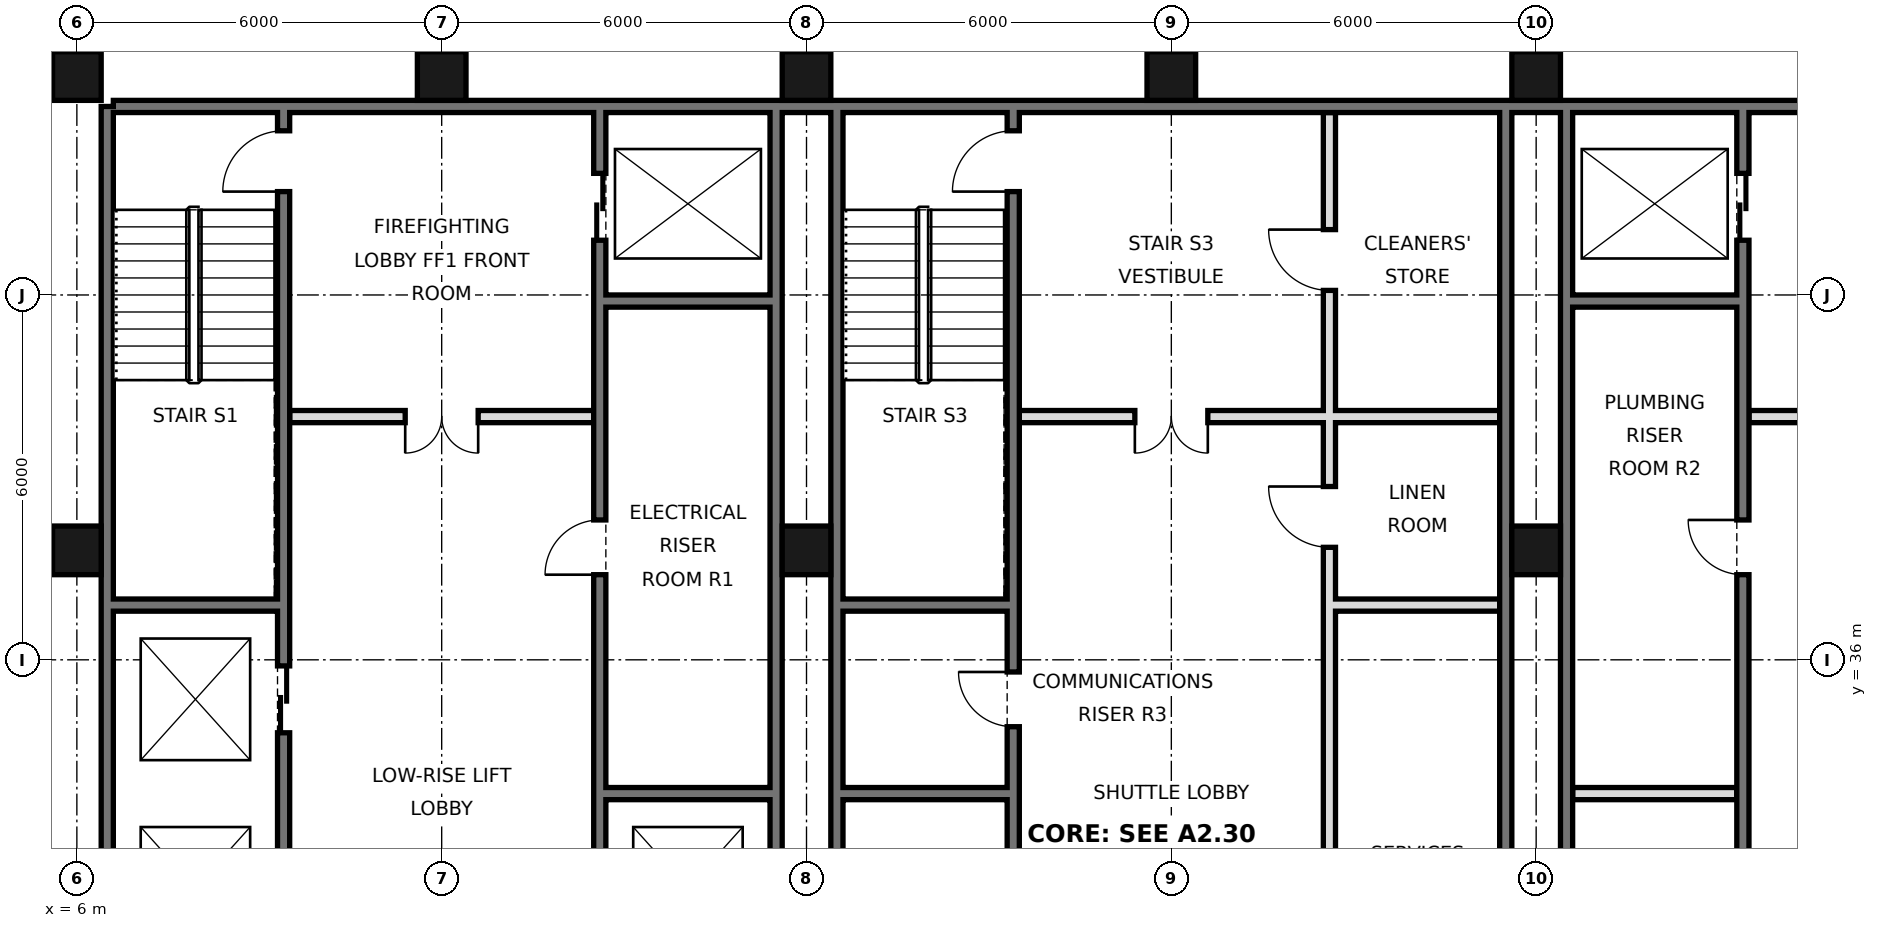
"""IFC4 building model, lengths in metres.
Left out: names, types, materials, properties, quantities, classifications, styles, units other than length and angle.
Written with IfcOpenShell. Run it as: python <this file> out.ifc"""

import sys

from ifc_helpers import new_model, si_unit, direction, frame, frame_2d, origin, origin_2d, place, context, subcontext, project, spatial, rectangle, hollow_rectangle, extrude, element, fill, save


model = new_model("IFC4")
c1 = context("Model", 3, precision=1e-05, world=origin(), true_north=direction((0.0, 1.0)))
c2 = subcontext(c1, "Body", "Model", "MODEL_VIEW")
j1 = project(units=[si_unit("LENGTHUNIT", "METRE"), si_unit("PLANEANGLEUNIT", "RADIAN")], contexts=[c1])
p1 = place(None, origin())
s1 = spatial("IfcSite", under=j1, at=p1, CompositionType="ELEMENT")
p2 = place(p1, origin())
s2 = spatial("IfcBuilding", under=s1, at=p2, CompositionType="ELEMENT")
p3 = place(p2, frame((0.0, 0.0, 119.6)))
s3 = spatial("IfcBuildingStorey", under=s2, at=p3, CompositionType="ELEMENT", Elevation=119.6)
for number, where, z_axis, x_axis in (
    (1, (6.0, 37.8, 0.0), (0.0, 0.0, 1.0), (1.0, 0.0, 0.0)),
    (2, (6.0, 45.6, 0.0), (0.0, 0.0, 1.0), (1.0, 0.0, 0.0)),
    (3, (12.0, 45.6, 0.0), (0.0, 0.0, 1.0), (1.0, 0.0, 0.0)),
    (4, (18.0, 37.8, 0.0), (0.0, 0.0, 1.0), (1.0, 0.0, 0.0)),
    (5, (18.0, 45.6, 0.0), (0.0, 0.0, 1.0), (1.0, 0.0, 0.0)),
    (6, (24.0, 45.6, 0.0), (0.0, 0.0, 1.0), (1.0, 0.0, 0.0)),
    (7, (30.0, 37.8, 0.0), (0.0, 0.0, 1.0), (1.0, 0.0, 0.0)),
    (8, (30.0, 45.6, 0.0), (0.0, 0.0, 1.0), (1.0, 0.0, 0.0)),
):
    element("IfcColumn", number, at=place(p3, frame(where, z_axis=z_axis, x_axis=x_axis)), inside=s3, PredefinedType="COLUMN", context=c2, shape_type="SweptSolid", body=[
        extrude(hollow_rectangle(XDim=0.8, YDim=0.8, WallThickness=0.05, at=origin_2d()), origin(), (0.0, 0.0, 1.0), 3.6),
    ])
p4 = place(p3, frame((6.5, 21.6, 0.0), z_axis=(0.0, 0.0, 1.0), x_axis=(0.0, 1.0, 0.0)))
e9 = element("IfcWall", 9, at=p4, inside=s3, PredefinedType="SOLIDWALL", context=c2, shape_type="SweptSolid", body=[
    extrude(rectangle(XDim=23.5, YDim=0.2, at=frame_2d((11.75, 0.0))), origin(), (0.0, 0.0, 1.0), 3.42),
])
p5 = place(p3, frame((6.6, 45.1, 0.0), z_axis=(0.0, 0.0, 1.0), x_axis=(1.0, 0.0, 0.0)))
e10 = element("IfcWall", 10, at=p5, inside=s3, PredefinedType="SOLIDWALL", context=c2, shape_type="SweptSolid", body=[
    extrude(rectangle(XDim=34.8, YDim=0.2, at=frame_2d((17.4, 0.0))), origin(), (0.0, 0.0, 1.0), 3.42),
])
for number, where, z_axis, x_axis in (
    (11, (17.5, 27.6, 0.0), (0.0, 0.0, 1.0), (0.0, 1.0, 0.0)),
    (12, (18.5, 27.6, 0.0), (0.0, 0.0, 1.0), (0.0, 1.0, 0.0)),
    (13, (29.5, 27.6, 0.0), (0.0, 0.0, 1.0), (0.0, 1.0, 0.0)),
    (14, (30.5, 27.6, 0.0), (0.0, 0.0, 1.0), (0.0, 1.0, 0.0)),
):
    element("IfcWall", number, at=place(p3, frame(where, z_axis=z_axis, x_axis=x_axis)), inside=s3, PredefinedType="SOLIDWALL", context=c2, shape_type="SweptSolid", body=[
        extrude(rectangle(XDim=17.5, YDim=0.2, at=frame_2d((8.75, 0.0))), origin(), (0.0, 0.0, 1.0), 3.42),
    ])
p6 = place(p3, frame((14.6, 27.5, 0.0), z_axis=(0.0, 0.0, 1.0), x_axis=(0.0, 1.0, 0.0)))
e15 = element("IfcWall", 15, at=p6, inside=s3, PredefinedType="SOLIDWALL", context=c2, shape_type="SweptSolid", body=[
    extrude(rectangle(XDim=17.5, YDim=0.2, at=frame_2d((8.75, 0.0))), origin(), (0.0, 0.0, 1.0), 3.42),
])
p7 = place(p6, frame((1.1, 0.0, 0.0)))
e16 = element("IfcOpeningElement", 16, at=p7, cuts=e15, PredefinedType="OPENING", context=c2, shape_type="SweptSolid", body=[
    extrude(rectangle(XDim=1.1, YDim=2.1, at=frame_2d((0.55, 1.05))), frame((0.0, 0.11, 0.0), z_axis=(0.0, -1.0, 0.0), x_axis=(1.0, 0.0, 0.0)), (0.0, 0.0, 1.0), 0.22),
])
p8 = place(p6, frame((4.2, 0.0, 0.0)))
e17 = element("IfcOpeningElement", 17, at=p8, cuts=e15, PredefinedType="OPENING", context=c2, shape_type="SweptSolid", body=[
    extrude(rectangle(XDim=1.1, YDim=2.1, at=frame_2d((0.55, 1.05))), frame((0.0, 0.11, 0.0), z_axis=(0.0, -1.0, 0.0), x_axis=(1.0, 0.0, 0.0)), (0.0, 0.0, 1.0), 0.22),
])
p9 = place(p6, frame((15.4, 0.0, 0.0)))
e18 = element("IfcOpeningElement", 18, at=p9, cuts=e15, PredefinedType="OPENING", context=c2, shape_type="SweptSolid", body=[
    extrude(rectangle(XDim=1.1, YDim=2.1, at=frame_2d((0.55, 1.05))), frame((0.0, 0.11, 0.0), z_axis=(0.0, -1.0, 0.0), x_axis=(1.0, 0.0, 0.0)), (0.0, 0.0, 1.0), 0.22),
])
p10 = place(p6, frame((9.9, 0.0, 0.0)))
e19 = element("IfcOpeningElement", 19, at=p10, cuts=e15, PredefinedType="OPENING", context=c2, shape_type="SweptSolid", body=[
    extrude(rectangle(XDim=0.9, YDim=2.1, at=frame_2d((0.45, 1.05))), frame((0.0, 0.11, 0.0), z_axis=(0.0, -1.0, 0.0), x_axis=(1.0, 0.0, 0.0)), (0.0, 0.0, 1.0), 0.22),
])
p11 = place(p3, frame((21.4, 27.5, 0.0), z_axis=(0.0, 0.0, 1.0), x_axis=(0.0, 1.0, 0.0)))
e20 = element("IfcWall", 20, at=p11, inside=s3, PredefinedType="SOLIDWALL", context=c2, shape_type="SweptSolid", body=[
    extrude(rectangle(XDim=17.5, YDim=0.2, at=frame_2d((8.75, 0.0))), origin(), (0.0, 0.0, 1.0), 3.42),
])
p12 = place(p11, frame((16.2, 0.0, 0.0)))
e21 = element("IfcOpeningElement", 21, at=p12, cuts=e20, PredefinedType="OPENING", context=c2, shape_type="SweptSolid", body=[
    extrude(rectangle(XDim=1.0, YDim=2.1, at=frame_2d((0.5, 1.05))), frame((0.0, 0.11, 0.0), z_axis=(0.0, -1.0, 0.0), x_axis=(1.0, 0.0, 0.0)), (0.0, 0.0, 1.0), 0.22),
])
p13 = place(p11, frame((7.4, 0.0, 0.0)))
e22 = element("IfcOpeningElement", 22, at=p13, cuts=e20, PredefinedType="OPENING", context=c2, shape_type="SweptSolid", body=[
    extrude(rectangle(XDim=0.9, YDim=2.1, at=frame_2d((0.45, 1.05))), frame((0.0, 0.11, 0.0), z_axis=(0.0, -1.0, 0.0), x_axis=(1.0, 0.0, 0.0)), (0.0, 0.0, 1.0), 0.22),
])
p14 = place(p3, frame((26.6, 27.5, 0.0), z_axis=(0.0, 0.0, 1.0), x_axis=(0.0, 1.0, 0.0)))
e23 = element("IfcWall", 23, at=p14, inside=s3, PredefinedType="SOLIDWALL", context=c2, shape_type="SweptSolid", body=[
    extrude(rectangle(XDim=17.5, YDim=0.2, at=frame_2d((8.75, 0.0))), origin(), (0.0, 0.0, 1.0), 3.42),
])
p15 = place(p14, frame((4.3, 0.0, 0.0)))
e24 = element("IfcOpeningElement", 24, at=p15, cuts=e23, PredefinedType="OPENING", context=c2, shape_type="SweptSolid", body=[
    extrude(rectangle(XDim=0.9, YDim=2.1, at=frame_2d((0.45, 1.05))), frame((0.0, 0.11, 0.0), z_axis=(0.0, -1.0, 0.0), x_axis=(1.0, 0.0, 0.0)), (0.0, 0.0, 1.0), 0.22),
])
p16 = place(p14, frame((10.35, 0.0, 0.0)))
e25 = element("IfcOpeningElement", 25, at=p16, cuts=e23, PredefinedType="OPENING", context=c2, shape_type="SweptSolid", body=[
    extrude(rectangle(XDim=1.0, YDim=2.1, at=frame_2d((0.5, 1.05))), frame((0.0, 0.11, 0.0), z_axis=(0.0, -1.0, 0.0), x_axis=(1.0, 0.0, 0.0)), (0.0, 0.0, 1.0), 0.22),
])
p17 = place(p14, frame((14.575, 0.0, 0.0)))
e26 = element("IfcOpeningElement", 26, at=p17, cuts=e23, PredefinedType="OPENING", context=c2, shape_type="SweptSolid", body=[
    extrude(rectangle(XDim=1.0, YDim=2.1, at=frame_2d((0.5, 1.05))), frame((0.0, 0.11, 0.0), z_axis=(0.0, -1.0, 0.0), x_axis=(1.0, 0.0, 0.0)), (0.0, 0.0, 1.0), 0.22),
])
p18 = place(p3, frame((33.4, 27.5, 0.0), z_axis=(0.0, 0.0, 1.0), x_axis=(0.0, 1.0, 0.0)))
e27 = element("IfcWall", 27, at=p18, inside=s3, PredefinedType="SOLIDWALL", context=c2, shape_type="SweptSolid", body=[
    extrude(rectangle(XDim=17.5, YDim=0.2, at=frame_2d((8.75, 0.0))), origin(), (0.0, 0.0, 1.0), 3.42),
])
p19 = place(p18, frame((15.4, 0.0, 0.0)))
e28 = element("IfcOpeningElement", 28, at=p19, cuts=e27, PredefinedType="OPENING", context=c2, shape_type="SweptSolid", body=[
    extrude(rectangle(XDim=1.1, YDim=2.1, at=frame_2d((0.55, 1.05))), frame((0.0, 0.11, 0.0), z_axis=(0.0, -1.0, 0.0), x_axis=(1.0, 0.0, 0.0)), (0.0, 0.0, 1.0), 0.22),
])
p20 = place(p18, frame((2.7, 0.0, 0.0)))
e29 = element("IfcOpeningElement", 29, at=p20, cuts=e27, PredefinedType="OPENING", context=c2, shape_type="SweptSolid", body=[
    extrude(rectangle(XDim=1.0, YDim=2.1, at=frame_2d((0.5, 1.05))), frame((0.0, 0.11, 0.0), z_axis=(0.0, -1.0, 0.0), x_axis=(1.0, 0.0, 0.0)), (0.0, 0.0, 1.0), 0.22),
])
p21 = place(p18, frame((9.9, 0.0, 0.0)))
e30 = element("IfcOpeningElement", 30, at=p21, cuts=e27, PredefinedType="OPENING", context=c2, shape_type="SweptSolid", body=[
    extrude(rectangle(XDim=0.9, YDim=2.1, at=frame_2d((0.45, 1.05))), frame((0.0, 0.11, 0.0), z_axis=(0.0, -1.0, 0.0), x_axis=(1.0, 0.0, 0.0)), (0.0, 0.0, 1.0), 0.22),
])
p22 = place(p3, frame((9.4, 21.6, 0.0), z_axis=(0.0, 0.0, 1.0), x_axis=(0.0, 1.0, 0.0)))
e31 = element("IfcWall", 31, at=p22, inside=s3, PredefinedType="SOLIDWALL", context=c2, shape_type="SweptSolid", body=[
    extrude(rectangle(XDim=23.4, YDim=0.2, at=frame_2d((11.7, 0.0))), origin(), (0.0, 0.0, 1.0), 3.42),
])
p23 = place(p22, frame((7.0, 0.0, 0.0)))
e32 = element("IfcOpeningElement", 32, at=p23, cuts=e31, PredefinedType="OPENING", context=c2, shape_type="SweptSolid", body=[
    extrude(rectangle(XDim=1.1, YDim=2.1, at=frame_2d((0.55, 1.05))), frame((0.0, 0.11, 0.0), z_axis=(0.0, -1.0, 0.0), x_axis=(1.0, 0.0, 0.0)), (0.0, 0.0, 1.0), 0.22),
])
p24 = place(p22, frame((10.1, 0.0, 0.0)))
e33 = element("IfcOpeningElement", 33, at=p24, cuts=e31, PredefinedType="OPENING", context=c2, shape_type="SweptSolid", body=[
    extrude(rectangle(XDim=1.1, YDim=2.1, at=frame_2d((0.55, 1.05))), frame((0.0, 0.11, 0.0), z_axis=(0.0, -1.0, 0.0), x_axis=(1.0, 0.0, 0.0)), (0.0, 0.0, 1.0), 0.22),
])
p25 = place(p22, frame((13.2, 0.0, 0.0)))
e34 = element("IfcOpeningElement", 34, at=p25, cuts=e31, PredefinedType="OPENING", context=c2, shape_type="SweptSolid", body=[
    extrude(rectangle(XDim=1.1, YDim=2.1, at=frame_2d((0.55, 1.05))), frame((0.0, 0.11, 0.0), z_axis=(0.0, -1.0, 0.0), x_axis=(1.0, 0.0, 0.0)), (0.0, 0.0, 1.0), 0.22),
])
p26 = place(p22, frame((22.1, 0.0, 0.0)))
e35 = element("IfcOpeningElement", 35, at=p26, cuts=e31, PredefinedType="OPENING", context=c2, shape_type="SweptSolid", body=[
    extrude(rectangle(XDim=1.0, YDim=2.1, at=frame_2d((0.5, 1.05))), frame((0.0, 0.11, 0.0), z_axis=(0.0, -1.0, 0.0), x_axis=(1.0, 0.0, 0.0)), (0.0, 0.0, 1.0), 0.22),
])
p27 = place(p22, frame((0.175, 0.0, 0.0)))
e36 = element("IfcOpeningElement", 36, at=p27, cuts=e31, PredefinedType="OPENING", context=c2, shape_type="SweptSolid", body=[
    extrude(rectangle(XDim=0.9, YDim=2.1, at=frame_2d((0.45, 1.05))), frame((0.0, 0.11, 0.0), z_axis=(0.0, -1.0, 0.0), x_axis=(1.0, 0.0, 0.0)), (0.0, 0.0, 1.0), 0.22),
])
for number, where, z_axis, x_axis in (
    (37, (14.7, 33.8, 0.0), (0.0, 0.0, 1.0), (1.0, 0.0, 0.0)),
    (38, (18.6, 33.8, 0.0), (0.0, 0.0, 1.0), (1.0, 0.0, 0.0)),
    (39, (30.6, 33.8, 0.0), (0.0, 0.0, 1.0), (1.0, 0.0, 0.0)),
    (40, (18.6, 36.9, 0.0), (0.0, 0.0, 1.0), (1.0, 0.0, 0.0)),
    (41, (26.7, 36.9, 0.0), (0.0, 0.0, 1.0), (1.0, 0.0, 0.0)),
    (42, (6.6, 36.9, 0.0), (0.0, 0.0, 1.0), (1.0, 0.0, 0.0)),
):
    element("IfcWall", number, at=place(p3, frame(where, z_axis=z_axis, x_axis=x_axis)), inside=s3, PredefinedType="SOLIDWALL", context=c2, shape_type="SweptSolid", body=[
        extrude(rectangle(XDim=2.7, YDim=0.2, at=frame_2d((1.35, 0.0))), origin(), (0.0, 0.0, 1.0), 3.42),
    ])
p28 = place(p3, frame((21.5, 40.0, 0.0), z_axis=(0.0, 0.0, 1.0), x_axis=(1.0, 0.0, 0.0)))
e43 = element("IfcWall", 43, at=p28, inside=s3, PredefinedType="PARTITIONING", context=c2, shape_type="SweptSolid", body=[
    extrude(rectangle(XDim=7.9, YDim=0.2, at=frame_2d((3.95, 0.0))), origin(), (0.0, 0.0, 1.0), 3.42),
])
p29 = place(p28, frame((1.9, 0.0, 0.0)))
e44 = element("IfcOpeningElement", 44, at=p29, cuts=e43, PredefinedType="OPENING", context=c2, shape_type="SweptSolid", body=[
    extrude(rectangle(XDim=1.2, YDim=2.1, at=frame_2d((0.6, 1.05))), frame((0.0, 0.11, 0.0), z_axis=(0.0, -1.0, 0.0), x_axis=(1.0, 0.0, 0.0)), (0.0, 0.0, 1.0), 0.22),
])
p30 = place(p3, frame((33.5, 40.0, 0.0), z_axis=(0.0, 0.0, 1.0), x_axis=(1.0, 0.0, 0.0)))
e45 = element("IfcWall", 45, at=p30, inside=s3, PredefinedType="PARTITIONING", context=c2, shape_type="SweptSolid", body=[
    extrude(rectangle(XDim=5.0, YDim=0.2, at=frame_2d((2.5, 0.0))), origin(), (0.0, 0.0, 1.0), 3.42),
])
p31 = place(p30, frame((1.9, 0.0, 0.0)))
e46 = element("IfcOpeningElement", 46, at=p31, cuts=e45, PredefinedType="OPENING", context=c2, shape_type="SweptSolid", body=[
    extrude(rectangle(XDim=1.2, YDim=2.1, at=frame_2d((0.6, 1.05))), frame((0.0, 0.11, 0.0), z_axis=(0.0, -1.0, 0.0), x_axis=(1.0, 0.0, 0.0)), (0.0, 0.0, 1.0), 0.22),
])
p32 = place(p3, frame((9.5, 40.0, 0.0), z_axis=(0.0, 0.0, 1.0), x_axis=(1.0, 0.0, 0.0)))
e47 = element("IfcWall", 47, at=p32, inside=s3, PredefinedType="PARTITIONING", context=c2, shape_type="SweptSolid", body=[
    extrude(rectangle(XDim=5.0, YDim=0.2, at=frame_2d((2.5, 0.0))), origin(), (0.0, 0.0, 1.0), 3.42),
])
p33 = place(p32, frame((1.9, 0.0, 0.0)))
e48 = element("IfcOpeningElement", 48, at=p33, cuts=e47, PredefinedType="OPENING", context=c2, shape_type="SweptSolid", body=[
    extrude(rectangle(XDim=1.2, YDim=2.1, at=frame_2d((0.6, 1.05))), frame((0.0, 0.11, 0.0), z_axis=(0.0, -1.0, 0.0), x_axis=(1.0, 0.0, 0.0)), (0.0, 0.0, 1.0), 0.22),
])
for number, where, z_axis, x_axis in (
    (49, (14.7, 41.9, 0.0), (0.0, 0.0, 1.0), (1.0, 0.0, 0.0)),
    (50, (30.6, 41.9, 0.0), (0.0, 0.0, 1.0), (1.0, 0.0, 0.0)),
):
    element("IfcWall", number, at=place(p3, frame(where, z_axis=z_axis, x_axis=x_axis)), inside=s3, PredefinedType="SOLIDWALL", context=c2, shape_type="SweptSolid", body=[
        extrude(rectangle(XDim=2.7, YDim=0.2, at=frame_2d((1.35, 0.0))), origin(), (0.0, 0.0, 1.0), 3.42),
    ])
p34 = place(p33, frame((1.2, 0.0, 0.0), z_axis=(0.0, 0.0, 1.0), x_axis=(-1.0, 0.0, 0.0)))
e51 = element("IfcDoor", 51, at=p34, inside=s3, OperationType="DOUBLE_DOOR_SINGLE_SWING", PredefinedType="DOOR", context=c2, shape_type="SweptSolid", body=[
    extrude(rectangle(XDim=1.2, YDim=2.1, at=frame_2d((0.6, 1.05))), frame((0.0, 0.025, 0.0), z_axis=(0.0, -1.0, 0.0), x_axis=(1.0, 0.0, 0.0)), (0.0, 0.0, 1.0), 0.05),
])
fill(e48, e51)
p35 = place(p29, frame((1.2, 0.0, 0.0), z_axis=(0.0, 0.0, 1.0), x_axis=(-1.0, 0.0, 0.0)))
e52 = element("IfcDoor", 52, at=p35, inside=s3, OperationType="DOUBLE_DOOR_SINGLE_SWING", PredefinedType="DOOR", context=c2, shape_type="SweptSolid", body=[
    extrude(rectangle(XDim=1.2, YDim=2.1, at=frame_2d((0.6, 1.05))), frame((0.0, 0.025, 0.0), z_axis=(0.0, -1.0, 0.0), x_axis=(1.0, 0.0, 0.0)), (0.0, 0.0, 1.0), 0.05),
])
fill(e44, e52)
p36 = place(p19, origin())
e53 = element("IfcDoor", 53, at=p36, inside=s3, OperationType="DOUBLE_DOOR_SLIDING", PredefinedType="DOOR", context=c2, shape_type="SweptSolid", body=[
    extrude(rectangle(XDim=1.1, YDim=2.1, at=frame_2d((0.55, 1.05))), frame((0.0, 0.025, 0.0), z_axis=(0.0, -1.0, 0.0), x_axis=(1.0, 0.0, 0.0)), (0.0, 0.0, 1.0), 0.05),
])
fill(e28, e53)
p37 = place(p9, origin())
e54 = element("IfcDoor", 54, at=p37, inside=s3, OperationType="DOUBLE_DOOR_SLIDING", PredefinedType="DOOR", context=c2, shape_type="SweptSolid", body=[
    extrude(rectangle(XDim=1.1, YDim=2.1, at=frame_2d((0.55, 1.05))), frame((0.0, 0.025, 0.0), z_axis=(0.0, -1.0, 0.0), x_axis=(1.0, 0.0, 0.0)), (0.0, 0.0, 1.0), 0.05),
])
fill(e18, e54)
p38 = place(p25, origin())
e55 = element("IfcDoor", 55, at=p38, inside=s3, OperationType="DOUBLE_DOOR_SLIDING", PredefinedType="DOOR", context=c2, shape_type="SweptSolid", body=[
    extrude(rectangle(XDim=1.1, YDim=2.1, at=frame_2d((0.55, 1.05))), frame((0.0, 0.025, 0.0), z_axis=(0.0, -1.0, 0.0), x_axis=(1.0, 0.0, 0.0)), (0.0, 0.0, 1.0), 0.05),
])
fill(e34, e55)
p39 = place(p26, origin())
e56 = element("IfcDoor", 56, at=p39, inside=s3, OperationType="SINGLE_SWING_LEFT", PredefinedType="DOOR", context=c2, shape_type="SweptSolid", body=[
    extrude(rectangle(XDim=1.0, YDim=2.1, at=frame_2d((0.5, 1.05))), frame((0.0, 0.025, 0.0), z_axis=(0.0, -1.0, 0.0), x_axis=(1.0, 0.0, 0.0)), (0.0, 0.0, 1.0), 0.05),
])
fill(e35, e56)
p40 = place(p12, origin())
e57 = element("IfcDoor", 57, at=p40, inside=s3, OperationType="SINGLE_SWING_LEFT", PredefinedType="DOOR", context=c2, shape_type="SweptSolid", body=[
    extrude(rectangle(XDim=1.0, YDim=2.1, at=frame_2d((0.5, 1.05))), frame((0.0, 0.025, 0.0), z_axis=(0.0, -1.0, 0.0), x_axis=(1.0, 0.0, 0.0)), (0.0, 0.0, 1.0), 0.05),
])
fill(e21, e57)
p41 = place(p10, origin())
e58 = element("IfcDoor", 58, at=p41, inside=s3, OperationType="SINGLE_SWING_LEFT", PredefinedType="DOOR", context=c2, shape_type="SweptSolid", body=[
    extrude(rectangle(XDim=0.9, YDim=2.1, at=frame_2d((0.45, 1.05))), frame((0.0, 0.025, 0.0), z_axis=(0.0, -1.0, 0.0), x_axis=(1.0, 0.0, 0.0)), (0.0, 0.0, 1.0), 0.05),
])
fill(e19, e58)
p42 = place(p21, frame((0.9, 0.0, 0.0), z_axis=(0.0, 0.0, 1.0), x_axis=(-1.0, 0.0, 0.0)))
e59 = element("IfcDoor", 59, at=p42, inside=s3, OperationType="SINGLE_SWING_LEFT", PredefinedType="DOOR", context=c2, shape_type="SweptSolid", body=[
    extrude(rectangle(XDim=0.9, YDim=2.1, at=frame_2d((0.45, 1.05))), frame((0.0, 0.025, 0.0), z_axis=(0.0, -1.0, 0.0), x_axis=(1.0, 0.0, 0.0)), (0.0, 0.0, 1.0), 0.05),
])
fill(e30, e59)
p43 = place(p13, frame((0.9, 0.0, 0.0), z_axis=(0.0, 0.0, 1.0), x_axis=(-1.0, 0.0, 0.0)))
e60 = element("IfcDoor", 60, at=p43, inside=s3, OperationType="SINGLE_SWING_LEFT", PredefinedType="DOOR", context=c2, shape_type="SweptSolid", body=[
    extrude(rectangle(XDim=0.9, YDim=2.1, at=frame_2d((0.45, 1.05))), frame((0.0, 0.025, 0.0), z_axis=(0.0, -1.0, 0.0), x_axis=(1.0, 0.0, 0.0)), (0.0, 0.0, 1.0), 0.05),
])
fill(e22, e60)
p44 = place(p16, frame((1.0, 0.0, 0.0), z_axis=(0.0, 0.0, 1.0), x_axis=(-1.0, 0.0, 0.0)))
e61 = element("IfcDoor", 61, at=p44, inside=s3, OperationType="SINGLE_SWING_LEFT", PredefinedType="DOOR", context=c2, shape_type="SweptSolid", body=[
    extrude(rectangle(XDim=1.0, YDim=2.1, at=frame_2d((0.5, 1.05))), frame((0.0, 0.025, 0.0), z_axis=(0.0, -1.0, 0.0), x_axis=(1.0, 0.0, 0.0)), (0.0, 0.0, 1.0), 0.05),
])
fill(e25, e61)
p45 = place(p17, frame((1.0, 0.0, 0.0), z_axis=(0.0, 0.0, 1.0), x_axis=(-1.0, 0.0, 0.0)))
e62 = element("IfcDoor", 62, at=p45, inside=s3, OperationType="SINGLE_SWING_LEFT", PredefinedType="DOOR", context=c2, shape_type="SweptSolid", body=[
    extrude(rectangle(XDim=1.0, YDim=2.1, at=frame_2d((0.5, 1.05))), frame((0.0, 0.025, 0.0), z_axis=(0.0, -1.0, 0.0), x_axis=(1.0, 0.0, 0.0)), (0.0, 0.0, 1.0), 0.05),
])
fill(e26, e62)
save(model, sys.argv[1])
